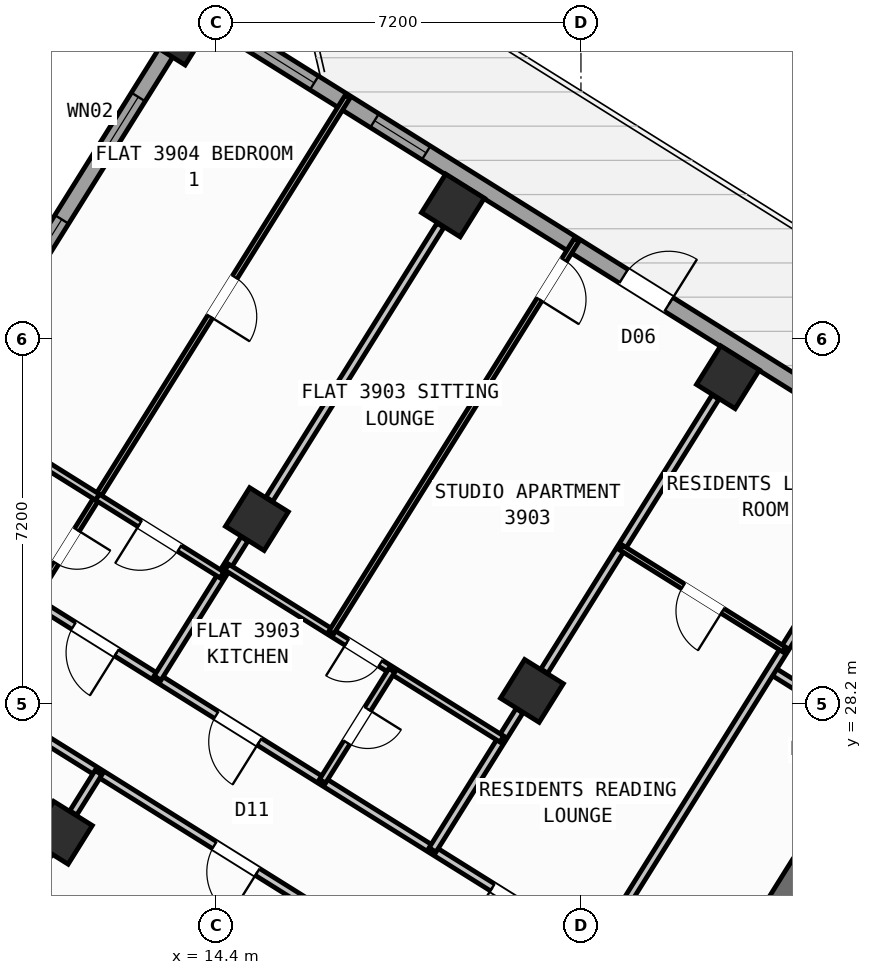
"""IFC4 building model, lengths in metres.
Left out: names, types, materials, properties, quantities, classifications, styles, units other than length and angle.
Written with IfcOpenShell. Run it as: python <this file> out.ifc"""

import sys

from ifc_helpers import new_model, si_unit, direction, frame, frame_2d, origin, origin_2d, place, context, subcontext, project, spatial, rectangle, hollow_rectangle, extrude, source, transform, mapped, element, fill, save


model = new_model("IFC4")
c1 = context("Model", 3, precision=1e-05, world=origin(), true_north=direction((0.0, 1.0)))
c2 = subcontext(c1, "Body", "Model", "MODEL_VIEW")
j1 = project(units=[si_unit("LENGTHUNIT", "METRE"), si_unit("PLANEANGLEUNIT", "RADIAN")], contexts=[c1])
p1 = place(None, origin())
s1 = spatial("IfcSite", under=j1, at=p1, CompositionType="ELEMENT")
p2 = place(p1, origin())
s2 = spatial("IfcBuilding", under=s1, at=p2, CompositionType="ELEMENT")
p3 = place(p2, frame((0.0, 0.0, 155.1)))
s3 = spatial("IfcBuildingStorey", under=s2, at=p3, CompositionType="ELEMENT", Elevation=155.1)
p4 = place(p3, frame((26.007, 24.976, 0.0), z_axis=(0.0, 0.0, 1.0), x_axis=(-0.529923795287, -0.848045264823, 0.0)))
e1 = element("IfcWall", 1, at=p4, inside=s3, PredefinedType="SHEAR", context=c2, shape_type="SweptSolid", body=[
    extrude(rectangle(XDim=6.425, YDim=0.55, at=frame_2d((3.212, 0.0))), origin(), (0.0, 0.0, 1.0), 3.35),
])
m1 = source(origin(), c2, "Body", "SweptSolid", [
    extrude(hollow_rectangle(XDim=0.9, YDim=0.9, WallThickness=0.036, at=origin_2d()), origin(), (0.0, 0.0, 1.0), 3.6),
])
for number, where, z_axis, x_axis in (
    (2, (24.5, 34.643, 0.0), (0.0, 0.0, 1.0), (-0.848, 0.53, 0.0)),
    (3, (20.632, 28.452, 0.0), (0.0, 0.0, 1.0), (-0.848, 0.53, 0.0)),
    (4, (19.073, 38.034, 0.0), (0.0, 0.0, 1.0), (-0.848, 0.53, 0.0)),
    (5, (15.205, 31.844, 0.0), (0.0, 0.0, 1.0), (-0.848, 0.53, 0.0)),
    (6, (11.336, 25.653, 0.0), (0.0, 0.0, 1.0), (-0.848, 0.53, 0.0)),
    (7, (13.646, 41.426, 0.0), (0.0, 0.0, 1.0), (-0.848, 0.53, 0.0)),
):
    element("IfcColumn", number, at=place(p3, frame(where, z_axis=z_axis, x_axis=x_axis)), inside=s3, PredefinedType="COLUMN", context=c2, shape_type="MappedRepresentation", body=[
        mapped(m1, transform((0.0, 0.0, 0.0), scale=1.0)),
    ])
p5 = place(p3, frame((2.415, 23.452, 0.0), z_axis=(0.0, 0.0, 1.0), x_axis=(0.52991049553, 0.848053575387, 0.0)))
e8 = element("IfcWall", 8, at=p5, inside=s3, PredefinedType="STANDARD", context=c2, shape_type="SweptSolid", body=[
    extrude(rectangle(XDim=21.587, YDim=0.32, at=frame_2d((10.794, 0.0))), origin(), (0.0, 0.0, 1.0), 2.775),
])
p6 = place(p5, frame((1.406, 0.0, 0.8)))
e9 = element("IfcOpeningElement", 9, at=p6, cuts=e8, PredefinedType="OPENING", context=c2, shape_type="SweptSolid", body=[
    extrude(rectangle(XDim=2.1, YDim=1.55, at=frame_2d((1.05, 0.775))), frame((0.0, 0.17, 0.0), z_axis=(0.0, -1.0, 0.0), x_axis=(1.0, 0.0, 0.0)), (0.0, 0.0, 1.0), 0.34),
])
p7 = place(p5, frame((10.949, 0.0, 1.0)))
e10 = element("IfcOpeningElement", 10, at=p7, cuts=e8, PredefinedType="OPENING", context=c2, shape_type="SweptSolid", body=[
    extrude(rectangle(XDim=0.9, YDim=1.25, at=frame_2d((0.45, 0.625))), frame((0.0, 0.17, 0.0), z_axis=(0.0, -1.0, 0.0), x_axis=(1.0, 0.0, 0.0)), (0.0, 0.0, 1.0), 0.34),
])
p8 = place(p5, frame((15.369, 0.0, 0.85)))
e11 = element("IfcOpeningElement", 11, at=p8, cuts=e8, PredefinedType="OPENING", context=c2, shape_type="SweptSolid", body=[
    extrude(rectangle(XDim=1.5, YDim=1.5, at=frame_2d((0.75, 0.75))), frame((0.0, 0.17, 0.0), z_axis=(0.0, -1.0, 0.0), x_axis=(1.0, 0.0, 0.0)), (0.0, 0.0, 1.0), 0.34),
])
p9 = place(p5, frame((18.219, 0.0, 0.85)))
e12 = element("IfcOpeningElement", 12, at=p9, cuts=e8, PredefinedType="OPENING", context=c2, shape_type="SweptSolid", body=[
    extrude(rectangle(XDim=1.5, YDim=1.5, at=frame_2d((0.75, 0.75))), frame((0.0, 0.17, 0.0), z_axis=(0.0, -1.0, 0.0), x_axis=(1.0, 0.0, 0.0)), (0.0, 0.0, 1.0), 0.34),
])
p10 = place(p3, frame((14.138, 41.825, 0.0), z_axis=(0.0, 0.0, 1.0), x_axis=(0.848046498049, -0.529921821731, 0.0)))
e13 = element("IfcWall", 13, at=p10, inside=s3, PredefinedType="STANDARD", context=c2, shape_type="SweptSolid", body=[
    extrude(rectangle(XDim=31.588, YDim=0.32, at=frame_2d((15.794, 0.0))), origin(), (0.0, 0.0, 1.0), 3.35),
])
p11 = place(p10, frame((9.792, 0.0, 0.0)))
e14 = element("IfcOpeningElement", 14, at=p11, cuts=e13, PredefinedType="OPENING", context=c2, shape_type="SweptSolid", body=[
    extrude(rectangle(XDim=1.05, YDim=2.15, at=frame_2d((0.525, 1.075))), frame((0.0, 0.17, 0.0), z_axis=(0.0, -1.0, 0.0), x_axis=(1.0, 0.0, 0.0)), (0.0, 0.0, 1.0), 0.34),
])
p12 = place(p10, frame((0.791, 0.0, 0.85)))
e15 = element("IfcOpeningElement", 15, at=p12, cuts=e13, PredefinedType="OPENING", context=c2, shape_type="SweptSolid", body=[
    extrude(rectangle(XDim=1.8, YDim=1.5, at=frame_2d((0.9, 0.75))), frame((0.0, 0.17, 0.0), z_axis=(0.0, -1.0, 0.0), x_axis=(1.0, 0.0, 0.0)), (0.0, 0.0, 1.0), 0.34),
])
p13 = place(p10, frame((3.996, 0.0, 0.95)))
e16 = element("IfcOpeningElement", 16, at=p13, cuts=e13, PredefinedType="OPENING", context=c2, shape_type="SweptSolid", body=[
    extrude(rectangle(XDim=1.2, YDim=1.4, at=frame_2d((0.6, 0.7))), frame((0.0, 0.17, 0.0), z_axis=(0.0, -1.0, 0.0), x_axis=(1.0, 0.0, 0.0)), (0.0, 0.0, 1.0), 0.34),
])
p14 = place(p10, frame((13.874, 0.0, 0.85)))
e17 = element("IfcOpeningElement", 17, at=p14, cuts=e13, PredefinedType="OPENING", context=c2, shape_type="SweptSolid", body=[
    extrude(rectangle(XDim=1.5, YDim=1.5, at=frame_2d((0.75, 0.75))), frame((0.0, 0.17, 0.0), z_axis=(0.0, -1.0, 0.0), x_axis=(1.0, 0.0, 0.0)), (0.0, 0.0, 1.0), 0.34),
])
p15 = place(p10, frame((17.104, 0.0, 1.0)))
e18 = element("IfcOpeningElement", 18, at=p15, cuts=e13, PredefinedType="OPENING", context=c2, shape_type="SweptSolid", body=[
    extrude(rectangle(XDim=0.9, YDim=1.25, at=frame_2d((0.45, 0.625))), frame((0.0, 0.17, 0.0), z_axis=(0.0, -1.0, 0.0), x_axis=(1.0, 0.0, 0.0)), (0.0, 0.0, 1.0), 0.34),
])
p16 = place(p10, frame((22.069, 0.0, 1.0)))
e19 = element("IfcOpeningElement", 19, at=p16, cuts=e13, PredefinedType="OPENING", context=c2, shape_type="SweptSolid", body=[
    extrude(rectangle(XDim=0.9, YDim=1.25, at=frame_2d((0.45, 0.625))), frame((0.0, 0.17, 0.0), z_axis=(0.0, -1.0, 0.0), x_axis=(1.0, 0.0, 0.0)), (0.0, 0.0, 1.0), 0.34),
])
p17 = place(p10, frame((27.519, 0.0, 1.0)))
e20 = element("IfcOpeningElement", 20, at=p17, cuts=e13, PredefinedType="OPENING", context=c2, shape_type="SweptSolid", body=[
    extrude(rectangle(XDim=0.9, YDim=1.25, at=frame_2d((0.45, 0.625))), frame((0.0, 0.17, 0.0), z_axis=(0.0, -1.0, 0.0), x_axis=(1.0, 0.0, 0.0)), (0.0, 0.0, 1.0), 0.34),
])
p18 = place(p3, frame((27.57, 27.478, 0.0), z_axis=(0.0, 0.0, 1.0), x_axis=(-0.848050851465, 0.529914854792, 0.0)))
e21 = element("IfcWall", 21, at=p18, inside=s3, PredefinedType="PARTITIONING", context=c2, shape_type="SweptSolid", body=[
    extrude(rectangle(XDim=2.61, YDim=0.16, at=frame_2d((1.305, 0.0))), origin(), (0.0, 0.0, 1.0), 3.34),
])
p19 = place(p18, frame((0.95, 0.0, 0.0)))
e22 = element("IfcOpeningElement", 22, at=p19, cuts=e21, PredefinedType="OPENING", context=c2, shape_type="SweptSolid", body=[
    extrude(rectangle(XDim=0.86, YDim=2.05, at=frame_2d((0.43, 1.025))), frame((0.0, 0.09, 0.0), z_axis=(0.0, -1.0, 0.0), x_axis=(1.0, 0.0, 0.0)), (0.0, 0.0, 1.0), 0.18),
])
p20 = place(p3, frame((27.953, 33.016, 0.0), z_axis=(0.0, 0.0, 1.0), x_axis=(-0.529905022231, -0.848056995381, 0.0)))
e23 = element("IfcWall", 23, at=p20, inside=s3, PredefinedType="PARTITIONING", context=c2, shape_type="SweptSolid", body=[
    extrude(rectangle(XDim=11.45, YDim=0.16, at=frame_2d((5.725, 0.0))), origin(), (0.0, 0.0, 1.0), 3.34),
])
p21 = place(p3, frame((21.885, 23.306, 0.0), z_axis=(0.0, 0.0, 1.0), x_axis=(-0.848052408131, 0.529912363569, 0.0)))
e24 = element("IfcWall", 24, at=p21, inside=s3, PredefinedType="PARTITIONING", context=c2, shape_type="SweptSolid", body=[
    extrude(rectangle(XDim=16.73, YDim=0.16, at=frame_2d((8.365, 0.0))), origin(), (0.0, 0.0, 1.0), 3.34),
])
p22 = place(p21, frame((1.395, 0.0, 0.0)))
e25 = element("IfcOpeningElement", 25, at=p22, cuts=e24, PredefinedType="OPENING", context=c2, shape_type="SweptSolid", body=[
    extrude(rectangle(XDim=1.0, YDim=2.1, at=frame_2d((0.5, 1.05))), frame((0.0, 0.09, 0.0), z_axis=(0.0, -1.0, 0.0), x_axis=(1.0, 0.0, 0.0)), (0.0, 0.0, 1.0), 0.18),
])
p23 = place(p21, frame((7.82, 0.0, 0.0)))
e26 = element("IfcOpeningElement", 26, at=p23, cuts=e24, PredefinedType="OPENING", context=c2, shape_type="SweptSolid", body=[
    extrude(rectangle(XDim=1.0, YDim=2.1, at=frame_2d((0.5, 1.05))), frame((0.0, 0.09, 0.0), z_axis=(0.0, -1.0, 0.0), x_axis=(1.0, 0.0, 0.0)), (0.0, 0.0, 1.0), 0.18),
])
p24 = place(p21, frame((11.14, 0.0, 0.0)))
e27 = element("IfcOpeningElement", 27, at=p24, cuts=e24, PredefinedType="OPENING", context=c2, shape_type="SweptSolid", body=[
    extrude(rectangle(XDim=1.0, YDim=2.1, at=frame_2d((0.5, 1.05))), frame((0.0, 0.09, 0.0), z_axis=(0.0, -1.0, 0.0), x_axis=(1.0, 0.0, 0.0)), (0.0, 0.0, 1.0), 0.18),
])
p25 = place(p3, frame((20.719, 21.44, 0.0), z_axis=(0.0, 0.0, 1.0), x_axis=(-0.848048310262, 0.529918921593, 0.0)))
e28 = element("IfcWall", 28, at=p25, inside=s3, PredefinedType="PARTITIONING", context=c2, shape_type="SweptSolid", body=[
    extrude(rectangle(XDim=16.73, YDim=0.16, at=frame_2d((8.365, 0.0))), origin(), (0.0, 0.0, 1.0), 3.34),
])
p26 = place(p25, frame((2.22, 0.0, 0.0)))
e29 = element("IfcOpeningElement", 29, at=p26, cuts=e28, PredefinedType="OPENING", context=c2, shape_type="SweptSolid", body=[
    extrude(rectangle(XDim=0.86, YDim=2.05, at=frame_2d((0.43, 1.025))), frame((0.0, 0.09, 0.0), z_axis=(0.0, -1.0, 0.0), x_axis=(1.0, 0.0, 0.0)), (0.0, 0.0, 1.0), 0.18),
])
p27 = place(p25, frame((6.49, 0.0, 0.0)))
e30 = element("IfcOpeningElement", 30, at=p27, cuts=e28, PredefinedType="OPENING", context=c2, shape_type="SweptSolid", body=[
    extrude(rectangle(XDim=1.0, YDim=2.1, at=frame_2d((0.5, 1.05))), frame((0.0, 0.09, 0.0), z_axis=(0.0, -1.0, 0.0), x_axis=(1.0, 0.0, 0.0)), (0.0, 0.0, 1.0), 0.18),
])
p28 = place(p25, frame((14.304, 0.0, 0.0)))
e31 = element("IfcOpeningElement", 31, at=p28, cuts=e28, PredefinedType="OPENING", context=c2, shape_type="SweptSolid", body=[
    extrude(rectangle(XDim=1.0, YDim=2.1, at=frame_2d((0.5, 1.05))), frame((0.0, 0.09, 0.0), z_axis=(0.0, -1.0, 0.0), x_axis=(1.0, 0.0, 0.0)), (0.0, 0.0, 1.0), 0.18),
])
p29 = place(p3, frame((12.078, 26.84, 0.0), z_axis=(0.0, 0.0, 1.0), x_axis=(-0.529952145338, -0.848027548876, 0.0)))
e32 = element("IfcWall", 32, at=p29, inside=s3, PredefinedType="PARTITIONING", context=c2, shape_type="SweptSolid", body=[
    extrude(rectangle(XDim=0.938, YDim=0.16, at=frame_2d((0.469, 0.0))), origin(), (0.0, 0.0, 1.0), 2.775),
])
p30 = place(p3, frame((24.256, 34.251, 0.0), z_axis=(0.0, 0.0, 1.0), x_axis=(-0.529919772691, -0.848047778437, 0.0)))
e33 = element("IfcWall", 33, at=p30, inside=s3, PredefinedType="PARTITIONING", context=c2, shape_type="SweptSolid", body=[
    extrude(rectangle(XDim=6.376, YDim=0.16, at=frame_2d((3.188, 0.0))), origin(), (0.0, 0.0, 1.0), 2.775),
])
p31 = place(p3, frame((20.387, 28.06, 0.0), z_axis=(0.0, 0.0, 1.0), x_axis=(-0.529890499457, -0.848066069705, 0.0)))
e34 = element("IfcWall", 34, at=p31, inside=s3, PredefinedType="PARTITIONING", context=c2, shape_type="SweptSolid", body=[
    extrude(rectangle(XDim=3.238, YDim=0.16, at=frame_2d((1.619, 0.0))), origin(), (0.0, 0.0, 1.0), 2.775),
])
p32 = place(p3, frame((25.612, 29.269, 0.0), z_axis=(0.0, 0.0, 1.0), x_axis=(-0.84803087207, 0.529946827537, 0.0)))
e35 = element("IfcWall", 35, at=p32, inside=s3, PredefinedType="PARTITIONING", context=c2, shape_type="SweptSolid", body=[
    extrude(rectangle(XDim=3.79, YDim=0.11, at=frame_2d((1.895, 0.0))), origin(), (0.0, 0.0, 1.0), 3.34),
])
p33 = place(p32, frame((1.435, 0.0, 0.0)))
e36 = element("IfcOpeningElement", 36, at=p33, cuts=e35, PredefinedType="OPENING", context=c2, shape_type="SweptSolid", body=[
    extrude(rectangle(XDim=0.92, YDim=2.08, at=frame_2d((0.46, 1.04))), frame((0.0, 0.065, 0.0), z_axis=(0.0, -1.0, 0.0), x_axis=(1.0, 0.0, 0.0)), (0.0, 0.0, 1.0), 0.13),
])
p34 = place(p3, frame((18.828, 37.643, 0.0), z_axis=(0.0, 0.0, 1.0), x_axis=(-0.529930102756, -0.848041323399, 0.0)))
e37 = element("IfcWall", 37, at=p34, inside=s3, PredefinedType="PARTITIONING", context=c2, shape_type="SweptSolid", body=[
    extrude(rectangle(XDim=6.376, YDim=0.16, at=frame_2d((3.188, 0.0))), origin(), (0.0, 0.0, 1.0), 2.775),
])
p35 = place(p3, frame((14.96, 31.452, 0.0), z_axis=(0.0, 0.0, 1.0), x_axis=(-0.529924383291, -0.848044897393, 0.0)))
e38 = element("IfcWall", 38, at=p35, inside=s3, PredefinedType="PARTITIONING", context=c2, shape_type="SweptSolid", body=[
    extrude(rectangle(XDim=3.238, YDim=0.16, at=frame_2d((1.619, 0.0))), origin(), (0.0, 0.0, 1.0), 2.775),
])
p36 = place(p3, frame((20.039, 27.502, 0.0), z_axis=(0.0, 0.0, 1.0), x_axis=(-0.848039019877, 0.529933789039, 0.0)))
e39 = element("IfcWall", 39, at=p36, inside=s3, PredefinedType="PLUMBINGWALL", context=c2, shape_type="SweptSolid", body=[
    extrude(rectangle(XDim=6.4, YDim=0.14, at=frame_2d((3.2, 0.0))), origin(), (0.0, 0.0, 1.0), 3.34),
])
p37 = place(p36, frame((2.824, 0.0, 0.0)))
e40 = element("IfcOpeningElement", 40, at=p37, cuts=e39, PredefinedType="OPENING", context=c2, shape_type="SweptSolid", body=[
    extrude(rectangle(XDim=0.78, YDim=2.05, at=frame_2d((0.39, 1.025))), frame((0.0, 0.08, 0.0), z_axis=(0.0, -1.0, 0.0), x_axis=(1.0, 0.0, 0.0)), (0.0, 0.0, 1.0), 0.16),
])
p38 = place(p3, frame((17.867, 28.859, 0.0), z_axis=(0.0, 0.0, 1.0), x_axis=(-0.529913878929, -0.848051461244, 0.0)))
e41 = element("IfcWall", 41, at=p38, inside=s3, PredefinedType="PLUMBINGWALL", context=c2, shape_type="SweptSolid", body=[
    extrude(rectangle(XDim=2.58, YDim=0.14, at=frame_2d((1.29, 0.0))), origin(), (0.0, 0.0, 1.0), 3.34),
])
p39 = place(p38, frame((0.9, 0.0, 0.0)))
e42 = element("IfcOpeningElement", 42, at=p39, cuts=e41, PredefinedType="OPENING", context=c2, shape_type="SweptSolid", body=[
    extrude(rectangle(XDim=0.78, YDim=2.05, at=frame_2d((0.39, 1.025))), frame((0.0, 0.08, 0.0), z_axis=(0.0, -1.0, 0.0), x_axis=(1.0, 0.0, 0.0)), (0.0, 0.0, 1.0), 0.16),
])
p40 = place(p3, frame((21.517, 37.356, 0.0), z_axis=(0.0, 0.0, 1.0), x_axis=(-0.529919705034, -0.848047820713, 0.0)))
e43 = element("IfcWall", 43, at=p40, inside=s3, PredefinedType="PARTITIONING", context=c2, shape_type="SweptSolid", body=[
    extrude(rectangle(XDim=9.14, YDim=0.11, at=frame_2d((4.57, 0.0))), origin(), (0.0, 0.0, 1.0), 3.34),
])
p41 = place(p40, frame((0.47, 0.0, 0.0)))
e44 = element("IfcOpeningElement", 44, at=p41, cuts=e43, PredefinedType="OPENING", context=c2, shape_type="SweptSolid", body=[
    extrude(rectangle(XDim=0.92, YDim=2.08, at=frame_2d((0.46, 1.04))), frame((0.0, 0.065, 0.0), z_axis=(0.0, -1.0, 0.0), x_axis=(1.0, 0.0, 0.0)), (0.0, 0.0, 1.0), 0.13),
])
p42 = place(p3, frame((16.995, 40.182, 0.0), z_axis=(0.0, 0.0, 1.0), x_axis=(-0.529927783988, -0.848042772363, 0.0)))
e45 = element("IfcWall", 45, at=p42, inside=s3, PredefinedType="PARTITIONING", context=c2, shape_type="SweptSolid", body=[
    extrude(rectangle(XDim=11.72, YDim=0.11, at=frame_2d((5.86, 0.0))), origin(), (0.0, 0.0, 1.0), 3.34),
])
p43 = place(p42, frame((10.08, 0.0, 0.0)))
e46 = element("IfcOpeningElement", 46, at=p43, cuts=e45, PredefinedType="OPENING", context=c2, shape_type="SweptSolid", body=[
    extrude(rectangle(XDim=0.78, YDim=2.05, at=frame_2d((0.39, 1.025))), frame((0.0, 0.065, 0.0), z_axis=(0.0, -1.0, 0.0), x_axis=(1.0, 0.0, 0.0)), (0.0, 0.0, 1.0), 0.13),
])
p44 = place(p42, frame((4.2, 0.0, 0.0)))
e47 = element("IfcOpeningElement", 47, at=p44, cuts=e45, PredefinedType="OPENING", context=c2, shape_type="SweptSolid", body=[
    extrude(rectangle(XDim=0.92, YDim=2.08, at=frame_2d((0.46, 1.04))), frame((0.0, 0.065, 0.0), z_axis=(0.0, -1.0, 0.0), x_axis=(1.0, 0.0, 0.0)), (0.0, 0.0, 1.0), 0.13),
])
p45 = place(p3, frame((14.516, 30.741, 0.0), z_axis=(0.0, 0.0, 1.0), x_axis=(-0.848059786386, 0.529900555496, 0.0)))
e48 = element("IfcWall", 48, at=p45, inside=s3, PredefinedType="PLUMBINGWALL", context=c2, shape_type="SweptSolid", body=[
    extrude(rectangle(XDim=2.9, YDim=0.14, at=frame_2d((1.45, 0.0))), origin(), (0.0, 0.0, 1.0), 3.34),
])
p46 = place(p45, frame((0.99, 0.0, 0.0)))
e49 = element("IfcOpeningElement", 49, at=p46, cuts=e48, PredefinedType="OPENING", context=c2, shape_type="SweptSolid", body=[
    extrude(rectangle(XDim=0.92, YDim=2.08, at=frame_2d((0.46, 1.04))), frame((0.0, 0.08, 0.0), z_axis=(0.0, -1.0, 0.0), x_axis=(1.0, 0.0, 0.0)), (0.0, 0.0, 1.0), 0.16),
])
p47 = place(p3, frame((12.056, 32.278, 0.0), z_axis=(0.0, 0.0, 1.0), x_axis=(-0.848039976902, 0.529932257535, 0.0)))
e50 = element("IfcWall", 50, at=p47, inside=s3, PredefinedType="PLUMBINGWALL", context=c2, shape_type="SweptSolid", body=[
    extrude(rectangle(XDim=3.62, YDim=0.14, at=frame_2d((1.81, 0.0))), origin(), (0.0, 0.0, 1.0), 3.34),
])
m2 = source(origin(), c2, "Body", "SweptSolid", [
    extrude(rectangle(XDim=1.05, YDim=2.15, at=frame_2d((0.525, 1.075))), frame((0.0, 0.025, 0.0), z_axis=(0.0, -1.0, 0.0), x_axis=(1.0, 0.0, 0.0)), (0.0, 0.0, 1.0), 0.05),
])
p48 = place(p11, origin())
e51 = element("IfcDoor", 51, at=p48, inside=s3, OperationType="SINGLE_SWING_RIGHT", PredefinedType="DOOR", context=c2, shape_type="MappedRepresentation", body=[
    mapped(m2, transform((0.0, 0.0, 0.0), scale=1.0)),
])
fill(e14, e51)
m3 = source(origin(), c2, "Body", "SweptSolid", [
    extrude(rectangle(XDim=1.5, YDim=1.5, at=frame_2d((0.75, 0.75))), frame((0.0, 0.03, 0.0), z_axis=(0.0, -1.0, 0.0), x_axis=(1.0, 0.0, 0.0)), (0.0, 0.0, 1.0), 0.06),
])
p49 = place(p8, origin())
e52 = element("IfcWindow", 52, at=p49, inside=s3, PartitioningType="SINGLE_PANEL", PredefinedType="WINDOW", context=c2, shape_type="MappedRepresentation", body=[
    mapped(m3, transform((0.0, 0.0, 0.0), scale=1.0)),
])
fill(e11, e52)
p50 = place(p9, origin())
e53 = element("IfcWindow", 53, at=p50, inside=s3, PartitioningType="SINGLE_PANEL", PredefinedType="WINDOW", context=c2, shape_type="MappedRepresentation", body=[
    mapped(m3, transform((0.0, 0.0, 0.0), scale=1.0)),
])
fill(e12, e53)
m4 = source(origin(), c2, "Body", "SweptSolid", [
    extrude(rectangle(XDim=1.8, YDim=1.5, at=frame_2d((0.9, 0.75))), frame((0.0, 0.03, 0.0), z_axis=(0.0, -1.0, 0.0), x_axis=(1.0, 0.0, 0.0)), (0.0, 0.0, 1.0), 0.06),
])
p51 = place(p12, origin())
e54 = element("IfcWindow", 54, at=p51, inside=s3, PartitioningType="SINGLE_PANEL", PredefinedType="WINDOW", context=c2, shape_type="MappedRepresentation", body=[
    mapped(m4, transform((0.0, 0.0, 0.0), scale=1.0)),
])
fill(e15, e54)
m5 = source(origin(), c2, "Body", "SweptSolid", [
    extrude(rectangle(XDim=1.2, YDim=1.4, at=frame_2d((0.6, 0.7))), frame((0.0, 0.03, 0.0), z_axis=(0.0, -1.0, 0.0), x_axis=(1.0, 0.0, 0.0)), (0.0, 0.0, 1.0), 0.06),
])
p52 = place(p13, origin())
e55 = element("IfcWindow", 55, at=p52, inside=s3, PartitioningType="SINGLE_PANEL", PredefinedType="WINDOW", context=c2, shape_type="MappedRepresentation", body=[
    mapped(m5, transform((0.0, 0.0, 0.0), scale=1.0)),
])
fill(e16, e55)
m6 = source(origin(), c2, "Body", "SweptSolid", [
    extrude(rectangle(XDim=1.0, YDim=2.1, at=frame_2d((0.5, 1.05))), frame((0.0, 0.025, 0.0), z_axis=(0.0, -1.0, 0.0), x_axis=(1.0, 0.0, 0.0)), (0.0, 0.0, 1.0), 0.05),
])
p53 = place(p27, origin())
e56 = element("IfcDoor", 56, at=p53, inside=s3, OperationType="SINGLE_SWING_LEFT", PredefinedType="DOOR", context=c2, shape_type="MappedRepresentation", body=[
    mapped(m6, transform((0.0, 0.0, 0.0), scale=1.0)),
])
fill(e30, e56)
p54 = place(p22, origin())
e57 = element("IfcDoor", 57, at=p54, inside=s3, OperationType="SINGLE_SWING_RIGHT", PredefinedType="DOOR", context=c2, shape_type="MappedRepresentation", body=[
    mapped(m6, transform((0.0, 0.0, 0.0), scale=1.0)),
])
fill(e25, e57)
m7 = source(origin(), c2, "Body", "SweptSolid", [
    extrude(rectangle(XDim=0.92, YDim=2.08, at=frame_2d((0.46, 1.04))), frame((0.0, 0.025, 0.0), z_axis=(0.0, -1.0, 0.0), x_axis=(1.0, 0.0, 0.0)), (0.0, 0.0, 1.0), 0.05),
])
p55 = place(p33, origin())
e58 = element("IfcDoor", 58, at=p55, inside=s3, OperationType="SINGLE_SWING_LEFT", PredefinedType="DOOR", context=c2, shape_type="MappedRepresentation", body=[
    mapped(m7, transform((0.0, 0.0, 0.0), scale=1.0)),
])
fill(e36, e58)
p56 = place(p41, origin())
e59 = element("IfcDoor", 59, at=p56, inside=s3, OperationType="SINGLE_SWING_RIGHT", PredefinedType="DOOR", context=c2, shape_type="MappedRepresentation", body=[
    mapped(m7, transform((0.0, 0.0, 0.0), scale=1.0)),
])
fill(e44, e59)
p57 = place(p23, origin())
e60 = element("IfcDoor", 60, at=p57, inside=s3, OperationType="SINGLE_SWING_LEFT", PredefinedType="DOOR", context=c2, shape_type="MappedRepresentation", body=[
    mapped(m6, transform((0.0, 0.0, 0.0), scale=1.0)),
])
fill(e26, e60)
m8 = source(origin(), c2, "Body", "SweptSolid", [
    extrude(rectangle(XDim=0.78, YDim=2.05, at=frame_2d((0.39, 1.025))), frame((0.0, 0.025, 0.0), z_axis=(0.0, -1.0, 0.0), x_axis=(1.0, 0.0, 0.0)), (0.0, 0.0, 1.0), 0.05),
])
p58 = place(p37, origin())
e61 = element("IfcDoor", 61, at=p58, inside=s3, OperationType="SINGLE_SWING_RIGHT", PredefinedType="DOOR", context=c2, shape_type="MappedRepresentation", body=[
    mapped(m8, transform((0.0, 0.0, 0.0), scale=1.0)),
])
fill(e40, e61)
p59 = place(p39, origin())
e62 = element("IfcDoor", 62, at=p59, inside=s3, OperationType="SINGLE_SWING_LEFT", PredefinedType="DOOR", context=c2, shape_type="MappedRepresentation", body=[
    mapped(m8, transform((0.0, 0.0, 0.0), scale=1.0)),
])
fill(e42, e62)
p60 = place(p24, origin())
e63 = element("IfcDoor", 63, at=p60, inside=s3, OperationType="SINGLE_SWING_LEFT", PredefinedType="DOOR", context=c2, shape_type="MappedRepresentation", body=[
    mapped(m6, transform((0.0, 0.0, 0.0), scale=1.0)),
])
fill(e27, e63)
p61 = place(p46, origin())
e64 = element("IfcDoor", 64, at=p61, inside=s3, OperationType="SINGLE_SWING_RIGHT", PredefinedType="DOOR", context=c2, shape_type="MappedRepresentation", body=[
    mapped(m7, transform((0.0, 0.0, 0.0), scale=1.0)),
])
fill(e49, e64)
p62 = place(p43, origin())
e65 = element("IfcDoor", 65, at=p62, inside=s3, OperationType="SINGLE_SWING_LEFT", PredefinedType="DOOR", context=c2, shape_type="MappedRepresentation", body=[
    mapped(m8, transform((0.0, 0.0, 0.0), scale=1.0)),
])
fill(e46, e65)
p63 = place(p44, origin())
e66 = element("IfcDoor", 66, at=p63, inside=s3, OperationType="SINGLE_SWING_RIGHT", PredefinedType="DOOR", context=c2, shape_type="MappedRepresentation", body=[
    mapped(m7, transform((0.0, 0.0, 0.0), scale=1.0)),
])
fill(e47, e66)
save(model, sys.argv[1])
